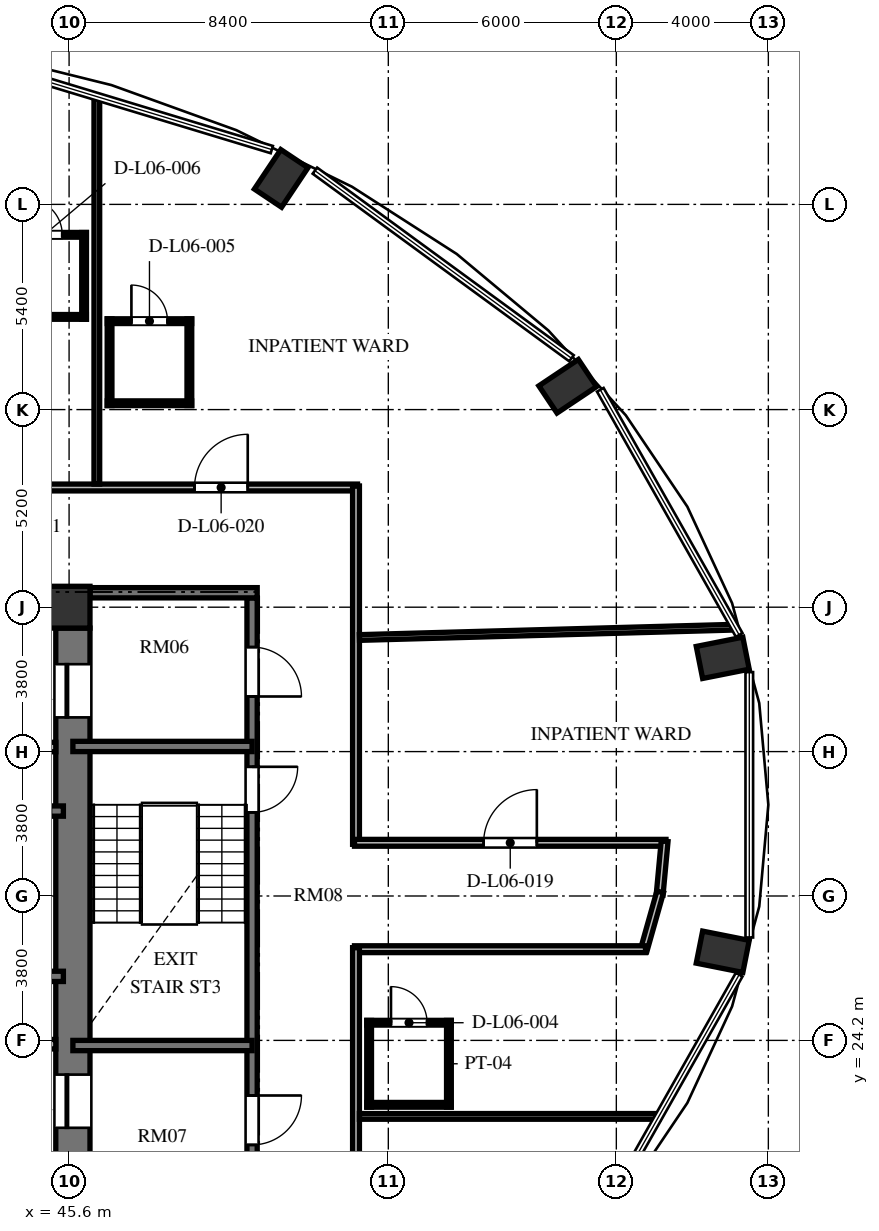
"""IFC4 building model, lengths in metres.
Left out: names, types, materials, properties, quantities, classifications, styles, units other than length and angle.
Written with IfcOpenShell. Run it as: python <this file> out.ifc"""

import sys

from ifc_helpers import new_model, si_unit, direction, frame, frame_2d, origin, origin_2d, place, context, subcontext, project, spatial, rectangle, extrude, element, fill, save


model = new_model("IFC4")
c1 = context("Model", 3, precision=1e-05, world=origin(), true_north=direction((0.0, 1.0)))
c2 = subcontext(c1, "Body", "Model", "MODEL_VIEW")
j1 = project(units=[si_unit("LENGTHUNIT", "METRE"), si_unit("PLANEANGLEUNIT", "RADIAN")], contexts=[c1])
p1 = place(None, origin())
s1 = spatial("IfcSite", under=j1, at=p1, CompositionType="ELEMENT")
p2 = place(p1, origin())
s2 = spatial("IfcBuilding", under=s1, at=p2, CompositionType="ELEMENT")
p3 = place(p2, frame((0.0, 0.0, 28.848)))
s3 = spatial("IfcBuildingStorey", under=s2, at=p3, CompositionType="ELEMENT", Elevation=28.848)
for number, where, z_axis, x_axis in (
    (1, (62.8, 26.532, 0.0), (0.0, 0.0, 1.0), (0.981, -0.195, 0.0)),
    (2, (62.8, 34.268, 0.0), (0.0, 0.0, 1.0), (0.981, 0.195, 0.0)),
    (3, (58.72, 41.414, 0.0), (0.0, 0.0, 1.0), (0.831, 0.556, 0.0)),
    (4, (51.181, 46.884, 0.0), (0.0, 0.0, 1.0), (0.556, 0.831, 0.0)),
):
    element("IfcColumn", number, at=place(p3, frame(where, z_axis=z_axis, x_axis=x_axis)), inside=s3, PredefinedType="COLUMN", context=c2, shape_type="SweptSolid", body=[
        extrude(rectangle(XDim=1.25, YDim=0.86, at=origin_2d()), origin(), (0.0, 0.0, 1.0), 3.648),
    ])
p4 = place(p3, frame((45.6, 35.6, 0.0), z_axis=(0.0, 0.0, 1.0), x_axis=(1.0, 0.0, 0.0)))
e5 = element("IfcColumn", 5, at=p4, inside=s3, PredefinedType="COLUMN", context=c2, shape_type="SweptSolid", body=[
    extrude(rectangle(XDim=1.1, YDim=1.1, at=origin_2d()), origin(), (0.0, 0.0, 1.0), 3.648),
])
p5 = place(p3, frame((45.7, 20.95, 0.0), z_axis=(0.0, 0.0, 1.0), x_axis=(0.0, 1.0, 0.0)))
e6 = element("IfcWall", 6, at=p5, inside=s3, PredefinedType="SHEAR", context=c2, shape_type="SweptSolid", body=[
    extrude(rectangle(XDim=14.1, YDim=0.9, at=frame_2d((7.05, 0.0))), origin(), (0.0, 0.0, 1.0), 3.648),
])
p6 = place(p5, frame((11.75, 0.0, 0.0)))
e7 = element("IfcOpeningElement", 7, at=p6, cuts=e6, PredefinedType="OPENING", context=c2, shape_type="SweptSolid", body=[
    extrude(rectangle(XDim=1.4, YDim=2.3, at=frame_2d((0.7, 1.15))), frame((0.0, 0.46, 0.0), z_axis=(0.0, -1.0, 0.0), x_axis=(1.0, 0.0, 0.0)), (0.0, 0.0, 1.0), 0.92),
])
p7 = place(p5, frame((0.95, 0.0, 0.0)))
e8 = element("IfcOpeningElement", 8, at=p7, cuts=e6, PredefinedType="OPENING", context=c2, shape_type="SweptSolid", body=[
    extrude(rectangle(XDim=1.4, YDim=2.3, at=frame_2d((0.7, 1.15))), frame((0.0, 0.46, 0.0), z_axis=(0.0, -1.0, 0.0), x_axis=(1.0, 0.0, 0.0)), (0.0, 0.0, 1.0), 0.92),
])
p8 = place(p3, frame((37.465, 30.235, 0.0), z_axis=(0.0, 0.0, 1.0), x_axis=(1.0, 0.0, 0.0)))
e9 = element("IfcWall", 9, at=p8, inside=s3, PredefinedType="SHEAR", context=c2, shape_type="SweptSolid", body=[
    extrude(rectangle(XDim=7.985, YDim=0.27, at=frame_2d((3.992, 0.0))), origin(), (0.0, 0.0, 1.0), 3.648),
])
p9 = place(p8, frame((6.455, 0.0, 0.0)))
e10 = element("IfcOpeningElement", 10, at=p9, cuts=e9, PredefinedType="OPENING", context=c2, shape_type="SweptSolid", body=[
    extrude(rectangle(XDim=1.2, YDim=2.15, at=frame_2d((0.6, 1.075))), frame((0.0, 0.145, 0.0), z_axis=(0.0, -1.0, 0.0), x_axis=(1.0, 0.0, 0.0)), (0.0, 0.0, 1.0), 0.29),
])
p10 = place(p3, frame((37.465, 25.885, 0.0), z_axis=(0.0, 0.0, 1.0), x_axis=(1.0, 0.0, 0.0)))
e11 = element("IfcWall", 11, at=p10, inside=s3, PredefinedType="SHEAR", context=c2, shape_type="SweptSolid", body=[
    extrude(rectangle(XDim=7.985, YDim=0.27, at=frame_2d((3.992, 0.0))), origin(), (0.0, 0.0, 1.0), 3.648),
])
for number, where, z_axis, x_axis in (
    (12, (42.95, 31.92, 0.0), (0.0, 0.0, 1.0), (1.0, 0.0, 0.0)),
    (13, (42.95, 24.1, 0.0), (0.0, 0.0, 1.0), (1.0, 0.0, 0.0)),
):
    element("IfcWall", number, at=place(p3, frame(where, z_axis=z_axis, x_axis=x_axis)), inside=s3, PredefinedType="SOLIDWALL", context=c2, shape_type="SweptSolid", body=[
        extrude(rectangle(XDim=2.3, YDim=0.25, at=frame_2d((1.15, 0.0))), origin(), (0.0, 0.0, 1.0), 3.428),
    ])
p11 = place(p3, frame((50.415, 35.845, 0.0), z_axis=(0.0, 0.0, 1.0), x_axis=(0.0, -1.0, 0.0)))
e14 = element("IfcWall", 14, at=p11, inside=s3, PredefinedType="SHEAR", context=c2, shape_type="SweptSolid", body=[
    extrude(rectangle(XDim=15.825, YDim=0.27, at=frame_2d((7.913, 0.0))), origin(), (0.0, 0.0, 1.0), 3.648),
])
p12 = place(p11, frame((4.445, 0.0, 0.0)))
e15 = element("IfcOpeningElement", 15, at=p12, cuts=e14, PredefinedType="OPENING", context=c2, shape_type="SweptSolid", body=[
    extrude(rectangle(XDim=1.2, YDim=2.15, at=frame_2d((0.6, 1.075))), frame((0.0, 0.145, 0.0), z_axis=(0.0, -1.0, 0.0), x_axis=(1.0, 0.0, 0.0)), (0.0, 0.0, 1.0), 0.29),
])
p13 = place(p11, frame((1.295, 0.0, 0.0)))
e16 = element("IfcOpeningElement", 16, at=p13, cuts=e14, PredefinedType="OPENING", context=c2, shape_type="SweptSolid", body=[
    extrude(rectangle(XDim=1.3, YDim=2.2, at=frame_2d((0.65, 1.1))), frame((0.0, 0.145, 0.0), z_axis=(0.0, -1.0, 0.0), x_axis=(1.0, 0.0, 0.0)), (0.0, 0.0, 1.0), 0.29),
])
p14 = place(p11, frame((13.095, 0.0, 0.0)))
e17 = element("IfcOpeningElement", 17, at=p14, cuts=e14, PredefinedType="OPENING", context=c2, shape_type="SweptSolid", body=[
    extrude(rectangle(XDim=1.3, YDim=2.2, at=frame_2d((0.65, 1.1))), frame((0.0, 0.145, 0.0), z_axis=(0.0, -1.0, 0.0), x_axis=(1.0, 0.0, 0.0)), (0.0, 0.0, 1.0), 0.29),
])
p15 = place(p3, frame((46.15, 35.98, 0.0), z_axis=(0.0, 0.0, 1.0), x_axis=(1.0, 0.0, 0.0)))
e18 = element("IfcWall", 18, at=p15, inside=s3, PredefinedType="SHEAR", context=c2, shape_type="SweptSolid", body=[
    extrude(rectangle(XDim=4.4, YDim=0.27, at=frame_2d((2.2, 0.0))), origin(), (0.0, 0.0, 1.0), 3.648),
])
for number, where, z_axis, x_axis in (
    (19, (45.7, 31.935, 0.0), (0.0, 0.0, 1.0), (1.0, 0.0, 0.0)),
    (20, (45.7, 24.065, 0.0), (0.0, 0.0, 1.0), (1.0, 0.0, 0.0)),
):
    element("IfcWall", number, at=place(p3, frame(where, z_axis=z_axis, x_axis=x_axis)), inside=s3, PredefinedType="SHEAR", context=c2, shape_type="SweptSolid", body=[
        extrude(rectangle(XDim=4.715, YDim=0.27, at=frame_2d((2.357, 0.0))), origin(), (0.0, 0.0, 1.0), 3.648),
    ])
p16 = place(p3, frame((23.31, 38.75, 0.0), z_axis=(0.0, 0.0, 1.0), x_axis=(1.0, 0.0, 0.0)))
e21 = element("IfcWall", 21, at=p16, inside=s3, PredefinedType="PARTITIONING", context=c2, shape_type="SweptSolid", body=[
    extrude(rectangle(XDim=29.88, YDim=0.18, at=frame_2d((14.94, 0.0))), origin(), (0.0, 0.0, 1.0), 3.053),
])
p17 = place(p16, frame((25.591, 0.0, 0.0)))
e22 = element("IfcOpeningElement", 22, at=p17, cuts=e21, PredefinedType="OPENING", context=c2, shape_type="SweptSolid", body=[
    extrude(rectangle(XDim=1.4, YDim=2.2, at=frame_2d((0.7, 1.1))), frame((0.0, 0.1, 0.0), z_axis=(0.0, -1.0, 0.0), x_axis=(1.0, 0.0, 0.0)), (0.0, 0.0, 1.0), 0.2),
])
p18 = place(p16, frame((20.24, 0.0, 0.0)))
e23 = element("IfcOpeningElement", 23, at=p18, cuts=e21, PredefinedType="OPENING", context=c2, shape_type="SweptSolid", body=[
    extrude(rectangle(XDim=1.4, YDim=2.2, at=frame_2d((0.7, 1.1))), frame((0.0, 0.1, 0.0), z_axis=(0.0, -1.0, 0.0), x_axis=(1.0, 0.0, 0.0)), (0.0, 0.0, 1.0), 0.2),
])
p19 = place(p16, frame((16.075, 0.0, 0.0)))
e24 = element("IfcOpeningElement", 24, at=p19, cuts=e21, PredefinedType="OPENING", context=c2, shape_type="SweptSolid", body=[
    extrude(rectangle(XDim=1.4, YDim=2.2, at=frame_2d((0.7, 1.1))), frame((0.0, 0.1, 0.0), z_axis=(0.0, -1.0, 0.0), x_axis=(1.0, 0.0, 0.0)), (0.0, 0.0, 1.0), 0.2),
])
p20 = place(p16, frame((11.905, 0.0, 0.0)))
e25 = element("IfcOpeningElement", 25, at=p20, cuts=e21, PredefinedType="OPENING", context=c2, shape_type="SweptSolid", body=[
    extrude(rectangle(XDim=1.4, YDim=2.2, at=frame_2d((0.7, 1.1))), frame((0.0, 0.1, 0.0), z_axis=(0.0, -1.0, 0.0), x_axis=(1.0, 0.0, 0.0)), (0.0, 0.0, 1.0), 0.2),
])
p21 = place(p16, frame((7.74, 0.0, 0.0)))
e26 = element("IfcOpeningElement", 26, at=p21, cuts=e21, PredefinedType="OPENING", context=c2, shape_type="SweptSolid", body=[
    extrude(rectangle(XDim=1.4, YDim=2.2, at=frame_2d((0.7, 1.1))), frame((0.0, 0.1, 0.0), z_axis=(0.0, -1.0, 0.0), x_axis=(1.0, 0.0, 0.0)), (0.0, 0.0, 1.0), 0.2),
])
p22 = place(p16, frame((2.639, 0.0, 0.0)))
e27 = element("IfcOpeningElement", 27, at=p22, cuts=e21, PredefinedType="OPENING", context=c2, shape_type="SweptSolid", body=[
    extrude(rectangle(XDim=1.4, YDim=2.2, at=frame_2d((0.7, 1.1))), frame((0.0, 0.1, 0.0), z_axis=(0.0, -1.0, 0.0), x_axis=(1.0, 0.0, 0.0)), (0.0, 0.0, 1.0), 0.2),
])
p23 = place(p3, frame((53.15, 38.79, 0.0), z_axis=(0.0, 0.0, 1.0), x_axis=(0.0, -1.0, 0.0)))
e28 = element("IfcWall", 28, at=p23, inside=s3, PredefinedType="PARTITIONING", context=c2, shape_type="SweptSolid", body=[
    extrude(rectangle(XDim=9.43, YDim=0.18, at=frame_2d((4.715, 0.0))), origin(), (0.0, 0.0, 1.0), 3.428),
])
p24 = place(p3, frame((53.11, 29.4, 0.0), z_axis=(0.0, 0.0, 1.0), x_axis=(1.0, 0.0, 0.0)))
e29 = element("IfcWall", 29, at=p24, inside=s3, PredefinedType="PARTITIONING", context=c2, shape_type="SweptSolid", body=[
    extrude(rectangle(XDim=8.197, YDim=0.18, at=frame_2d((4.098, 0.0))), origin(), (0.0, 0.0, 1.0), 3.428),
])
p25 = place(p24, frame((3.398, 0.0, 0.0)))
e30 = element("IfcOpeningElement", 30, at=p25, cuts=e29, PredefinedType="OPENING", context=c2, shape_type="SweptSolid", body=[
    extrude(rectangle(XDim=1.4, YDim=2.2, at=frame_2d((0.7, 1.1))), frame((0.0, 0.1, 0.0), z_axis=(0.0, -1.0, 0.0), x_axis=(1.0, 0.0, 0.0)), (0.0, 0.0, 1.0), 0.2),
])
p26 = place(p3, frame((61.271, 29.44, 0.0), z_axis=(0.0, 0.0, 1.0), x_axis=(-0.092539930621, -0.995708974169, 0.0)))
e31 = element("IfcWall", 31, at=p26, inside=s3, PredefinedType="PARTITIONING", context=c2, shape_type="SweptSolid", body=[
    extrude(rectangle(XDim=1.417, YDim=0.18, at=frame_2d((0.708, 0.0))), origin(), (0.0, 0.0, 1.0), 3.428),
])
p27 = place(p3, frame((61.154, 28.107, 0.0), z_axis=(0.0, 0.0, 1.0), x_axis=(-0.271748942561, -0.962368179138, 0.0)))
e32 = element("IfcWall", 32, at=p27, inside=s3, PredefinedType="PARTITIONING", context=c2, shape_type="SweptSolid", body=[
    extrude(rectangle(XDim=1.606, YDim=0.18, at=frame_2d((0.803, 0.0))), origin(), (0.0, 0.0, 1.0), 3.428),
])
p28 = place(p3, frame((60.768, 26.6, 0.0), z_axis=(0.0, 0.0, 1.0), x_axis=(-1.0, 0.0, 0.0)))
e33 = element("IfcWall", 33, at=p28, inside=s3, PredefinedType="PARTITIONING", context=c2, shape_type="SweptSolid", body=[
    extrude(rectangle(XDim=7.658, YDim=0.18, at=frame_2d((3.829, 0.0))), origin(), (0.0, 0.0, 1.0), 3.428),
])
p29 = place(p3, frame((53.15, 26.64, 0.0), z_axis=(0.0, 0.0, 1.0), x_axis=(0.0, -1.0, 0.0)))
e34 = element("IfcWall", 34, at=p29, inside=s3, PredefinedType="PARTITIONING", context=c2, shape_type="SweptSolid", body=[
    extrude(rectangle(XDim=6.66, YDim=0.18, at=frame_2d((3.33, 0.0))), origin(), (0.0, 0.0, 1.0), 3.428),
])
p30 = place(p3, frame((53.24, 22.2, 0.0), z_axis=(0.0, 0.0, 1.0), x_axis=(1.0, 0.0, 0.0)))
e35 = element("IfcWall", 35, at=p30, inside=s3, PredefinedType="PARTITIONING", context=c2, shape_type="SweptSolid", body=[
    extrude(rectangle(XDim=7.875, YDim=0.15, at=frame_2d((3.938, 0.0))), origin(), (0.0, 0.0, 1.0), 3.428),
])
p31 = place(p3, frame((53.24, 34.802, 0.0), z_axis=(0.0, 0.0, 1.0), x_axis=(0.999620561748, 0.027545099924, 0.0)))
e36 = element("IfcWall", 36, at=p31, inside=s3, PredefinedType="PARTITIONING", context=c2, shape_type="SweptSolid", body=[
    extrude(rectangle(XDim=9.891, YDim=0.15, at=frame_2d((4.946, 0.0))), origin(), (0.0, 0.0, 1.0), 2.813),
])
p32 = place(p3, frame((46.33, 38.84, 0.0), z_axis=(0.0, 0.0, 1.0), x_axis=(0.0, 1.0, 0.0)))
e37 = element("IfcWall", 37, at=p32, inside=s3, PredefinedType="PARTITIONING", context=c2, shape_type="SweptSolid", body=[
    extrude(rectangle(XDim=10.185, YDim=0.15, at=frame_2d((5.092, 0.0))), origin(), (0.0, 0.0, 1.0), 3.428),
])
p33 = place(p3, frame((53.435, 24.665, 0.0), z_axis=(0.0, 0.0, 1.0), x_axis=(1.0, 0.0, 0.0)))
e38 = element("IfcWall", 38, at=p33, inside=s3, PredefinedType="PARTITIONING", context=c2, shape_type="SweptSolid", body=[
    extrude(rectangle(XDim=2.22, YDim=0.125, at=frame_2d((1.11, 0.0))), origin(), (0.0, 0.0, 1.0), 3.428),
])
p34 = place(p33, frame((0.635, 0.0, 0.0)))
e39 = element("IfcOpeningElement", 39, at=p34, cuts=e38, PredefinedType="OPENING", context=c2, shape_type="SweptSolid", body=[
    extrude(rectangle(XDim=0.95, YDim=2.1, at=frame_2d((0.475, 1.05))), frame((0.0, 0.073, 0.0), z_axis=(0.0, -1.0, 0.0), x_axis=(1.0, 0.0, 0.0)), (0.0, 0.0, 1.0), 0.145),
])
p35 = place(p3, frame((53.435, 22.505, 0.0), z_axis=(0.0, 0.0, 1.0), x_axis=(1.0, 0.0, 0.0)))
e40 = element("IfcWall", 40, at=p35, inside=s3, PredefinedType="PARTITIONING", context=c2, shape_type="SweptSolid", body=[
    extrude(rectangle(XDim=2.22, YDim=0.125, at=frame_2d((1.11, 0.0))), origin(), (0.0, 0.0, 1.0), 3.428),
])
for number, where, z_axis, x_axis in (
    (41, (55.595, 22.445, 0.0), (0.0, 0.0, 1.0), (0.0, 1.0, 0.0)),
    (42, (53.495, 22.445, 0.0), (0.0, 0.0, 1.0), (0.0, 1.0, 0.0)),
):
    element("IfcWall", number, at=place(p3, frame(where, z_axis=z_axis, x_axis=x_axis)), inside=s3, PredefinedType="PARTITIONING", context=c2, shape_type="SweptSolid", body=[
        extrude(rectangle(XDim=2.28, YDim=0.125, at=frame_2d((1.14, 0.0))), origin(), (0.0, 0.0, 1.0), 3.428),
    ])
p36 = place(p3, frame((46.605, 43.127, 0.0), z_axis=(0.0, 0.0, 1.0), x_axis=(1.0, 0.0, 0.0)))
e43 = element("IfcWall", 43, at=p36, inside=s3, PredefinedType="PARTITIONING", context=c2, shape_type="SweptSolid", body=[
    extrude(rectangle(XDim=2.22, YDim=0.125, at=frame_2d((1.11, 0.0))), origin(), (0.0, 0.0, 1.0), 3.428),
])
p37 = place(p36, frame((0.635, 0.0, 0.0)))
e44 = element("IfcOpeningElement", 44, at=p37, cuts=e43, PredefinedType="OPENING", context=c2, shape_type="SweptSolid", body=[
    extrude(rectangle(XDim=0.95, YDim=2.1, at=frame_2d((0.475, 1.05))), frame((0.0, 0.073, 0.0), z_axis=(0.0, -1.0, 0.0), x_axis=(1.0, 0.0, 0.0)), (0.0, 0.0, 1.0), 0.145),
])
p38 = place(p3, frame((46.605, 40.967, 0.0), z_axis=(0.0, 0.0, 1.0), x_axis=(1.0, 0.0, 0.0)))
e45 = element("IfcWall", 45, at=p38, inside=s3, PredefinedType="PARTITIONING", context=c2, shape_type="SweptSolid", body=[
    extrude(rectangle(XDim=2.22, YDim=0.125, at=frame_2d((1.11, 0.0))), origin(), (0.0, 0.0, 1.0), 3.428),
])
for number, where, z_axis, x_axis in (
    (46, (48.765, 40.907, 0.0), (0.0, 0.0, 1.0), (0.0, 1.0, 0.0)),
    (47, (46.665, 40.907, 0.0), (0.0, 0.0, 1.0), (0.0, 1.0, 0.0)),
):
    element("IfcWall", number, at=place(p3, frame(where, z_axis=z_axis, x_axis=x_axis)), inside=s3, PredefinedType="PARTITIONING", context=c2, shape_type="SweptSolid", body=[
        extrude(rectangle(XDim=2.28, YDim=0.125, at=frame_2d((1.14, 0.0))), origin(), (0.0, 0.0, 1.0), 3.428),
    ])
p39 = place(p3, frame((43.835, 45.399, 0.0), z_axis=(0.0, 0.0, 1.0), x_axis=(1.0, 0.0, 0.0)))
e48 = element("IfcWall", 48, at=p39, inside=s3, PredefinedType="PARTITIONING", context=c2, shape_type="SweptSolid", body=[
    extrude(rectangle(XDim=2.22, YDim=0.125, at=frame_2d((1.11, 0.0))), origin(), (0.0, 0.0, 1.0), 3.013),
])
p40 = place(p39, frame((0.635, 0.0, 0.0)))
e49 = element("IfcOpeningElement", 49, at=p40, cuts=e48, PredefinedType="OPENING", context=c2, shape_type="SweptSolid", body=[
    extrude(rectangle(XDim=0.95, YDim=2.1, at=frame_2d((0.475, 1.05))), frame((0.0, 0.073, 0.0), z_axis=(0.0, -1.0, 0.0), x_axis=(1.0, 0.0, 0.0)), (0.0, 0.0, 1.0), 0.145),
])
p41 = place(p3, frame((43.835, 43.239, 0.0), z_axis=(0.0, 0.0, 1.0), x_axis=(1.0, 0.0, 0.0)))
e50 = element("IfcWall", 50, at=p41, inside=s3, PredefinedType="PARTITIONING", context=c2, shape_type="SweptSolid", body=[
    extrude(rectangle(XDim=2.22, YDim=0.125, at=frame_2d((1.11, 0.0))), origin(), (0.0, 0.0, 1.0), 3.053),
])
p42 = place(p3, frame((45.995, 43.179, 0.0), z_axis=(0.0, 0.0, 1.0), x_axis=(0.0, 1.0, 0.0)))
e51 = element("IfcWall", 51, at=p42, inside=s3, PredefinedType="PARTITIONING", context=c2, shape_type="SweptSolid", body=[
    extrude(rectangle(XDim=2.28, YDim=0.125, at=frame_2d((1.14, 0.0))), origin(), (0.0, 0.0, 1.0), 3.428),
])
p43 = place(p6, origin())
e52 = element("IfcDoor", 52, at=p43, inside=s3, OperationType="SLIDING_TO_LEFT", PredefinedType="DOOR", context=c2, shape_type="SweptSolid", body=[
    extrude(rectangle(XDim=1.4, YDim=2.3, at=frame_2d((0.7, 1.15))), frame((0.0, 0.025, 0.0), z_axis=(0.0, -1.0, 0.0), x_axis=(1.0, 0.0, 0.0)), (0.0, 0.0, 1.0), 0.05),
])
fill(e7, e52)
p44 = place(p7, origin())
e53 = element("IfcDoor", 53, at=p44, inside=s3, OperationType="SLIDING_TO_LEFT", PredefinedType="DOOR", context=c2, shape_type="SweptSolid", body=[
    extrude(rectangle(XDim=1.4, YDim=2.3, at=frame_2d((0.7, 1.15))), frame((0.0, 0.025, 0.0), z_axis=(0.0, -1.0, 0.0), x_axis=(1.0, 0.0, 0.0)), (0.0, 0.0, 1.0), 0.05),
])
fill(e8, e53)
p45 = place(p12, origin())
e54 = element("IfcDoor", 54, at=p45, inside=s3, OperationType="SINGLE_SWING_LEFT", PredefinedType="DOOR", context=c2, shape_type="SweptSolid", body=[
    extrude(rectangle(XDim=1.2, YDim=2.15, at=frame_2d((0.6, 1.075))), frame((0.0, 0.025, 0.0), z_axis=(0.0, -1.0, 0.0), x_axis=(1.0, 0.0, 0.0)), (0.0, 0.0, 1.0), 0.05),
])
fill(e15, e54)
p46 = place(p13, origin())
e55 = element("IfcDoor", 55, at=p46, inside=s3, OperationType="SINGLE_SWING_RIGHT", PredefinedType="DOOR", context=c2, shape_type="SweptSolid", body=[
    extrude(rectangle(XDim=1.3, YDim=2.2, at=frame_2d((0.65, 1.1))), frame((0.0, 0.025, 0.0), z_axis=(0.0, -1.0, 0.0), x_axis=(1.0, 0.0, 0.0)), (0.0, 0.0, 1.0), 0.05),
])
fill(e16, e55)
p47 = place(p14, origin())
e56 = element("IfcDoor", 56, at=p47, inside=s3, OperationType="SINGLE_SWING_LEFT", PredefinedType="DOOR", context=c2, shape_type="SweptSolid", body=[
    extrude(rectangle(XDim=1.3, YDim=2.2, at=frame_2d((0.65, 1.1))), frame((0.0, 0.025, 0.0), z_axis=(0.0, -1.0, 0.0), x_axis=(1.0, 0.0, 0.0)), (0.0, 0.0, 1.0), 0.05),
])
fill(e17, e56)
p48 = place(p34, origin())
e57 = element("IfcDoor", 57, at=p48, inside=s3, OperationType="SINGLE_SWING_LEFT", PredefinedType="DOOR", context=c2, shape_type="SweptSolid", body=[
    extrude(rectangle(XDim=0.95, YDim=2.1, at=frame_2d((0.475, 1.05))), frame((0.0, 0.025, 0.0), z_axis=(0.0, -1.0, 0.0), x_axis=(1.0, 0.0, 0.0)), (0.0, 0.0, 1.0), 0.05),
])
fill(e39, e57)
p49 = place(p25, origin())
e58 = element("IfcDoor", 58, at=p49, inside=s3, OperationType="SINGLE_SWING_RIGHT", PredefinedType="DOOR", context=c2, shape_type="SweptSolid", body=[
    extrude(rectangle(XDim=1.4, YDim=2.2, at=frame_2d((0.7, 1.1))), frame((0.0, 0.025, 0.0), z_axis=(0.0, -1.0, 0.0), x_axis=(1.0, 0.0, 0.0)), (0.0, 0.0, 1.0), 0.05),
])
fill(e30, e58)
p50 = place(p37, origin())
e59 = element("IfcDoor", 59, at=p50, inside=s3, OperationType="SINGLE_SWING_LEFT", PredefinedType="DOOR", context=c2, shape_type="SweptSolid", body=[
    extrude(rectangle(XDim=0.95, YDim=2.1, at=frame_2d((0.475, 1.05))), frame((0.0, 0.025, 0.0), z_axis=(0.0, -1.0, 0.0), x_axis=(1.0, 0.0, 0.0)), (0.0, 0.0, 1.0), 0.05),
])
fill(e44, e59)
p51 = place(p17, origin())
e60 = element("IfcDoor", 60, at=p51, inside=s3, OperationType="SINGLE_SWING_RIGHT", PredefinedType="DOOR", context=c2, shape_type="SweptSolid", body=[
    extrude(rectangle(XDim=1.4, YDim=2.2, at=frame_2d((0.7, 1.1))), frame((0.0, 0.025, 0.0), z_axis=(0.0, -1.0, 0.0), x_axis=(1.0, 0.0, 0.0)), (0.0, 0.0, 1.0), 0.05),
])
fill(e22, e60)
p52 = place(p40, origin())
e61 = element("IfcDoor", 61, at=p52, inside=s3, OperationType="SINGLE_SWING_LEFT", PredefinedType="DOOR", context=c2, shape_type="SweptSolid", body=[
    extrude(rectangle(XDim=0.95, YDim=2.1, at=frame_2d((0.475, 1.05))), frame((0.0, 0.025, 0.0), z_axis=(0.0, -1.0, 0.0), x_axis=(1.0, 0.0, 0.0)), (0.0, 0.0, 1.0), 0.05),
])
fill(e49, e61)
save(model, sys.argv[1])
